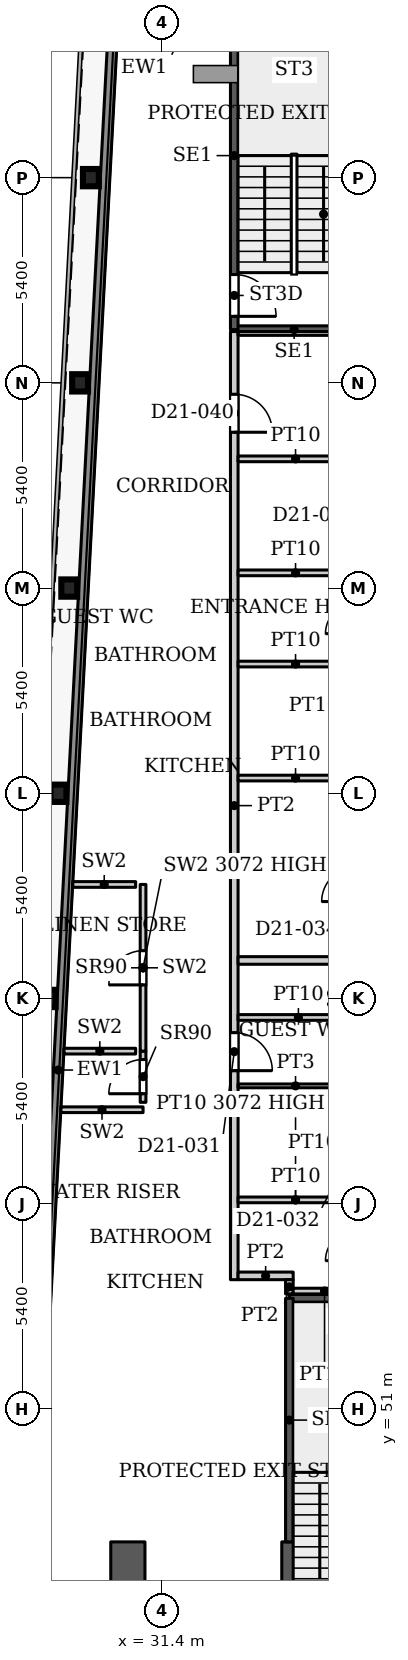
"""IFC4 building model, lengths in metres.
Left out: names, types, materials, properties, quantities, classifications, styles, units other than length and angle.
Written with IfcOpenShell. Run it as: python <this file> out.ifc"""

import sys

from ifc_helpers import new_model, si_unit, direction, frame, frame_2d, origin, origin_2d, place, context, subcontext, project, spatial, rectangle, i_section, extrude, source, transform, mapped, element, fill, save


model = new_model("IFC4")
c1 = context("Model", 3, precision=1e-05, world=origin(), true_north=direction((0.0, 1.0)))
c2 = subcontext(c1, "Body", "Model", "MODEL_VIEW")
j1 = project(units=[si_unit("LENGTHUNIT", "METRE"), si_unit("PLANEANGLEUNIT", "RADIAN")], contexts=[c1])
p1 = place(None, origin())
s1 = spatial("IfcSite", under=j1, at=p1, CompositionType="ELEMENT")
p2 = place(p1, origin())
s2 = spatial("IfcBuilding", under=s1, at=p2, CompositionType="ELEMENT")
p3 = place(p2, frame((0.0, 0.0, 98.0)))
s3 = spatial("IfcBuildingStorey", under=s2, at=p3, CompositionType="ELEMENT", Elevation=98.0)
for number, where, z_axis, x_axis in (
    (1, (28.39, 61.8, 0.0), (0.0, 0.0, 1.0), (1.0, 0.0, 0.0)),
    (2, (28.674, 67.2, 0.0), (0.0, 0.0, 1.0), (1.0, 0.0, 0.0)),
    (3, (28.958, 72.6, 0.0), (0.0, 0.0, 1.0), (1.0, 0.0, 0.0)),
    (4, (29.243, 78.0, 0.0), (0.0, 0.0, 1.0), (1.0, 0.0, 0.0)),
    (5, (29.527, 83.4, 0.0), (0.0, 0.0, 1.0), (1.0, 0.0, 0.0)),
):
    element("IfcColumn", number, at=place(p3, frame(where, z_axis=z_axis, x_axis=x_axis)), inside=s3, PredefinedType="COLUMN", context=c2, shape_type="SweptSolid", body=[
        extrude(i_section(OverallWidth=0.418, OverallDepth=0.455, WebThickness=0.042, FlangeThickness=0.068, FilletRadius=0.014, at=origin_2d()), origin(), (0.0, 0.0, 1.0), 3.9),
    ])
p4 = place(p3, frame((34.75, 29.05, 0.0), z_axis=(0.0, 0.0, 1.0), x_axis=(0.0, 1.0, 0.0)))
e6 = element("IfcWall", 6, at=p4, inside=s3, PredefinedType="SHEAR", context=c2, shape_type="SweptSolid", body=[
    extrude(rectangle(XDim=18.45, YDim=0.4, at=frame_2d((9.225, 0.0))), origin(), (0.0, 0.0, 1.0), 3.9),
])
p5 = place(p4, frame((8.025, 0.0, 0.0)))
e7 = element("IfcOpeningElement", 7, at=p5, cuts=e6, PredefinedType="OPENING", context=c2, shape_type="SweptSolid", body=[
    extrude(rectangle(XDim=1.1, YDim=2.2, at=frame_2d((0.55, 1.1))), frame((0.0, 0.21, 0.0), z_axis=(0.0, -1.0, 0.0), x_axis=(1.0, 0.0, 0.0)), (0.0, 0.0, 1.0), 0.42),
])
p6 = place(p4, frame((10.875, 0.0, 0.0)))
e8 = element("IfcOpeningElement", 8, at=p6, cuts=e6, PredefinedType="OPENING", context=c2, shape_type="SweptSolid", body=[
    extrude(rectangle(XDim=1.1, YDim=2.2, at=frame_2d((0.55, 1.1))), frame((0.0, 0.21, 0.0), z_axis=(0.0, -1.0, 0.0), x_axis=(1.0, 0.0, 0.0)), (0.0, 0.0, 1.0), 0.42),
])
p7 = place(p4, frame((13.725, 0.0, 0.0)))
e9 = element("IfcOpeningElement", 9, at=p7, cuts=e6, PredefinedType="OPENING", context=c2, shape_type="SweptSolid", body=[
    extrude(rectangle(XDim=1.1, YDim=2.2, at=frame_2d((0.55, 1.1))), frame((0.0, 0.21, 0.0), z_axis=(0.0, -1.0, 0.0), x_axis=(1.0, 0.0, 0.0)), (0.0, 0.0, 1.0), 0.42),
])
p8 = place(p4, frame((15.95, 0.0, 0.0)))
e10 = element("IfcOpeningElement", 10, at=p8, cuts=e6, PredefinedType="OPENING", context=c2, shape_type="SweptSolid", body=[
    extrude(rectangle(XDim=1.1, YDim=2.2, at=frame_2d((0.55, 1.1))), frame((0.0, 0.21, 0.0), z_axis=(0.0, -1.0, 0.0), x_axis=(1.0, 0.0, 0.0)), (0.0, 0.0, 1.0), 0.42),
])
p9 = place(p3, frame((30.5, 29.05, 0.0), z_axis=(0.0, 0.0, 1.0), x_axis=(0.0, 1.0, 0.0)))
e11 = element("IfcWall", 11, at=p9, inside=s3, PredefinedType="SHEAR", context=c2, shape_type="SweptSolid", body=[
    extrude(rectangle(XDim=18.45, YDim=0.9, at=frame_2d((9.225, 0.0))), origin(), (0.0, 0.0, 1.0), 3.9),
])
p10 = place(p9, frame((1.5, 0.0, 0.0)))
e12 = element("IfcOpeningElement", 12, at=p10, cuts=e11, PredefinedType="OPENING", context=c2, shape_type="SweptSolid", body=[
    extrude(rectangle(XDim=0.9, YDim=2.2, at=frame_2d((0.45, 1.1))), frame((0.0, 0.46, 0.0), z_axis=(0.0, -1.0, 0.0), x_axis=(1.0, 0.0, 0.0)), (0.0, 0.0, 1.0), 0.92),
])
p11 = place(p9, frame((6.03, 0.0, 0.0)))
e13 = element("IfcOpeningElement", 13, at=p11, cuts=e11, PredefinedType="OPENING", context=c2, shape_type="SweptSolid", body=[
    extrude(rectangle(XDim=0.9, YDim=2.2, at=frame_2d((0.45, 1.1))), frame((0.0, 0.46, 0.0), z_axis=(0.0, -1.0, 0.0), x_axis=(1.0, 0.0, 0.0)), (0.0, 0.0, 1.0), 0.92),
])
p12 = place(p9, frame((9.7, 0.0, 0.0)))
e14 = element("IfcOpeningElement", 14, at=p12, cuts=e11, PredefinedType="OPENING", context=c2, shape_type="SweptSolid", body=[
    extrude(rectangle(XDim=0.9, YDim=2.2, at=frame_2d((0.45, 1.1))), frame((0.0, 0.46, 0.0), z_axis=(0.0, -1.0, 0.0), x_axis=(1.0, 0.0, 0.0)), (0.0, 0.0, 1.0), 0.92),
])
p13 = place(p3, frame((27.195, 31.969, 0.0), z_axis=(0.0, 0.0, 1.0), x_axis=(0.052559748861, 0.998617781135, 0.0)))
e15 = element("IfcWall", 15, at=p13, inside=s3, PredefinedType="SOLIDWALL", context=c2, shape_type="SweptSolid", body=[
    extrude(rectangle(XDim=55.972, YDim=0.25, at=frame_2d((27.986, 0.0))), origin(), (0.0, 0.0, 1.0), 3.75),
])
p14 = place(p3, frame((34.75, 53.91, 0.0), z_axis=(0.0, 0.0, 1.0), x_axis=(1.0, 0.0, 0.0)))
e16 = element("IfcWall", 16, at=p14, inside=s3, PredefinedType="SHEAR", context=c2, shape_type="SweptSolid", body=[
    extrude(rectangle(XDim=3.15, YDim=0.2, at=frame_2d((1.575, 0.0))), origin(), (0.0, 0.0, 1.0), 3.9),
])
p15 = place(p3, frame((34.75, 47.5, 0.0), z_axis=(0.0, 0.0, 1.0), x_axis=(0.0, 1.0, 0.0)))
e17 = element("IfcWall", 17, at=p15, inside=s3, PredefinedType="SHEAR", context=c2, shape_type="SweptSolid", body=[
    extrude(rectangle(XDim=6.41, YDim=0.2, at=frame_2d((3.205, 0.0))), origin(), (0.0, 0.0, 1.0), 3.9),
])
p16 = place(p3, frame((33.3, 79.4, 0.0), z_axis=(0.0, 0.0, 1.0), x_axis=(1.0, 0.0, 0.0)))
e18 = element("IfcWall", 18, at=p16, inside=s3, PredefinedType="SHEAR", context=c2, shape_type="SweptSolid", body=[
    extrude(rectangle(XDim=3.15, YDim=0.2, at=frame_2d((1.575, 0.0))), origin(), (0.0, 0.0, 1.0), 3.9),
])
p17 = place(p3, frame((33.3, 79.4, 0.0), z_axis=(0.0, 0.0, 1.0), x_axis=(0.0, 1.0, 0.0)))
e19 = element("IfcWall", 19, at=p17, inside=s3, PredefinedType="SHEAR", context=c2, shape_type="SweptSolid", body=[
    extrude(rectangle(XDim=9.16, YDim=0.2, at=frame_2d((4.58, 0.0))), origin(), (0.0, 0.0, 1.0), 3.9),
])
p18 = place(p17, frame((0.35, 0.0, 0.0)))
e20 = element("IfcOpeningElement", 20, at=p18, cuts=e19, PredefinedType="OPENING", context=c2, shape_type="SweptSolid", body=[
    extrude(rectangle(XDim=1.1, YDim=2.2, at=frame_2d((0.55, 1.1))), frame((0.0, 0.11, 0.0), z_axis=(0.0, -1.0, 0.0), x_axis=(1.0, 0.0, 0.0)), (0.0, 0.0, 1.0), 0.22),
])
p19 = place(p3, frame((28.739, 58.872, 0.0), z_axis=(0.0, 0.0, 1.0), x_axis=(1.0, 0.0, 0.0)))
e21 = element("IfcWall", 21, at=p19, inside=s3, PredefinedType="PARTITIONING", context=c2, shape_type="SweptSolid", body=[
    extrude(rectangle(XDim=2.161, YDim=0.15, at=frame_2d((1.081, 0.0))), origin(), (0.0, 0.0, 1.0), 3.9),
])
p20 = place(p3, frame((30.9, 59.067, 0.0), z_axis=(0.0, 0.0, 1.0), x_axis=(0.0, 1.0, 0.0)))
e22 = element("IfcWall", 22, at=p20, inside=s3, PredefinedType="PARTITIONING", context=c2, shape_type="SweptSolid", body=[
    extrude(rectangle(XDim=1.347, YDim=0.15, at=frame_2d((0.674, 0.0))), origin(), (0.0, 0.0, 1.0), 3.9),
])
p21 = place(p20, frame((0.226, 0.0, 0.0)))
e23 = element("IfcOpeningElement", 23, at=p21, cuts=e22, PredefinedType="OPENING", context=c2, shape_type="SweptSolid", body=[
    extrude(rectangle(XDim=0.9, YDim=2.2, at=frame_2d((0.45, 1.1))), frame((0.0, 0.085, 0.0), z_axis=(0.0, -1.0, 0.0), x_axis=(1.0, 0.0, 0.0)), (0.0, 0.0, 1.0), 0.17),
])
p22 = place(p3, frame((28.82, 60.414, 0.0), z_axis=(0.0, 0.0, 1.0), x_axis=(1.0, 0.0, 0.0)))
e24 = element("IfcWall", 24, at=p22, inside=s3, PredefinedType="PARTITIONING", context=c2, shape_type="SweptSolid", body=[
    extrude(rectangle(XDim=1.885, YDim=0.15, at=frame_2d((0.942, 0.0))), origin(), (0.0, 0.0, 1.0), 3.9),
])
p23 = place(p3, frame((30.9, 60.414, 0.0), z_axis=(0.0, 0.0, 1.0), x_axis=(0.0, 1.0, 0.0)))
e25 = element("IfcWall", 25, at=p23, inside=s3, PredefinedType="PARTITIONING", context=c2, shape_type="SweptSolid", body=[
    extrude(rectangle(XDim=4.386, YDim=0.15, at=frame_2d((2.193, 0.0))), origin(), (0.0, 0.0, 1.0), 3.072),
])
p24 = place(p23, frame((1.743, 0.0, 0.0)))
e26 = element("IfcOpeningElement", 26, at=p24, cuts=e25, PredefinedType="OPENING", context=c2, shape_type="SweptSolid", body=[
    extrude(rectangle(XDim=0.9, YDim=2.2, at=frame_2d((0.45, 1.1))), frame((0.0, 0.085, 0.0), z_axis=(0.0, -1.0, 0.0), x_axis=(1.0, 0.0, 0.0)), (0.0, 0.0, 1.0), 0.17),
])
p25 = place(p3, frame((29.051, 64.8, 0.0), z_axis=(0.0, 0.0, 1.0), x_axis=(1.0, 0.0, 0.0)))
e27 = element("IfcWall", 27, at=p25, inside=s3, PredefinedType="PARTITIONING", context=c2, shape_type="SweptSolid", body=[
    extrude(rectangle(XDim=1.654, YDim=0.15, at=frame_2d((0.827, 0.0))), origin(), (0.0, 0.0, 1.0), 3.9),
])
p26 = place(p3, frame((33.3, 54.4, 0.0), z_axis=(0.0, 0.0, 1.0), x_axis=(0.0, 1.0, 0.0)))
e28 = element("IfcWall", 28, at=p26, inside=s3, PredefinedType="PARTITIONING", context=c2, shape_type="SweptSolid", body=[
    extrude(rectangle(XDim=24.95, YDim=0.2, at=frame_2d((12.475, 0.0))), origin(), (0.0, 0.0, 1.0), 3.6),
])
p27 = place(p26, frame((5.5, 0.0, 0.0)))
e29 = element("IfcOpeningElement", 29, at=p27, cuts=e28, PredefinedType="OPENING", context=c2, shape_type="SweptSolid", body=[
    extrude(rectangle(XDim=1.0, YDim=2.1, at=frame_2d((0.5, 1.05))), frame((0.0, 0.11, 0.0), z_axis=(0.0, -1.0, 0.0), x_axis=(1.0, 0.0, 0.0)), (0.0, 0.0, 1.0), 0.22),
])
p28 = place(p26, frame((22.3, 0.0, 0.0)))
e30 = element("IfcOpeningElement", 30, at=p28, cuts=e28, PredefinedType="OPENING", context=c2, shape_type="SweptSolid", body=[
    extrude(rectangle(XDim=1.0, YDim=2.1, at=frame_2d((0.5, 1.05))), frame((0.0, 0.11, 0.0), z_axis=(0.0, -1.0, 0.0), x_axis=(1.0, 0.0, 0.0)), (0.0, 0.0, 1.0), 0.22),
])
p29 = place(p3, frame((33.4, 54.5, 0.0), z_axis=(0.0, 0.0, 1.0), x_axis=(1.0, 0.0, 0.0)))
e31 = element("IfcWall", 31, at=p29, inside=s3, PredefinedType="PARTITIONING", context=c2, shape_type="SweptSolid", body=[
    extrude(rectangle(XDim=1.45, YDim=0.2, at=frame_2d((0.725, 0.0))), origin(), (0.0, 0.0, 1.0), 3.6),
])
p30 = place(p3, frame((33.4, 56.5, 0.0), z_axis=(0.0, 0.0, 1.0), x_axis=(1.0, 0.0, 0.0)))
e32 = element("IfcWall", 32, at=p30, inside=s3, PredefinedType="PARTITIONING", context=c2, shape_type="SweptSolid", body=[
    extrude(rectangle(XDim=3.025, YDim=0.15, at=frame_2d((1.513, 0.0))), origin(), (0.0, 0.0, 1.0), 3.072),
])
p31 = place(p3, frame((33.4, 59.5, 0.0), z_axis=(0.0, 0.0, 1.0), x_axis=(1.0, 0.0, 0.0)))
e33 = element("IfcWall", 33, at=p31, inside=s3, PredefinedType="PARTITIONING", context=c2, shape_type="SweptSolid", body=[
    extrude(rectangle(XDim=3.025, YDim=0.1, at=frame_2d((1.513, 0.0))), origin(), (0.0, 0.0, 1.0), 3.6),
])
p32 = place(p3, frame((33.4, 61.3, 0.0), z_axis=(0.0, 0.0, 1.0), x_axis=(1.0, 0.0, 0.0)))
e34 = element("IfcWall", 34, at=p32, inside=s3, PredefinedType="PARTITIONING", context=c2, shape_type="SweptSolid", body=[
    extrude(rectangle(XDim=3.175, YDim=0.15, at=frame_2d((1.587, 0.0))), origin(), (0.0, 0.0, 1.0), 3.6),
])
p33 = place(p3, frame((33.4, 62.8, 0.0), z_axis=(0.0, 0.0, 1.0), x_axis=(1.0, 0.0, 0.0)))
e35 = element("IfcWall", 35, at=p33, inside=s3, PredefinedType="PARTITIONING", context=c2, shape_type="SweptSolid", body=[
    extrude(rectangle(XDim=12.5, YDim=0.2, at=frame_2d((6.25, 0.0))), origin(), (0.0, 0.0, 1.0), 3.6),
])
for number, where, z_axis, x_axis in (
    (36, (33.4, 67.6, 0.0), (0.0, 0.0, 1.0), (1.0, 0.0, 0.0)),
    (37, (33.4, 70.6, 0.0), (0.0, 0.0, 1.0), (1.0, 0.0, 0.0)),
    (38, (33.4, 73.0, 0.0), (0.0, 0.0, 1.0), (1.0, 0.0, 0.0)),
    (39, (33.4, 76.0, 0.0), (0.0, 0.0, 1.0), (1.0, 0.0, 0.0)),
):
    element("IfcWall", number, at=place(p3, frame(where, z_axis=z_axis, x_axis=x_axis)), inside=s3, PredefinedType="PARTITIONING", context=c2, shape_type="SweptSolid", body=[
        extrude(rectangle(XDim=3.025, YDim=0.15, at=frame_2d((1.513, 0.0))), origin(), (0.0, 0.0, 1.0), 3.6),
    ])
p34 = place(p3, frame((33.4, 79.3, 0.0), z_axis=(0.0, 0.0, 1.0), x_axis=(1.0, 0.0, 0.0)))
e40 = element("IfcWall", 40, at=p34, inside=s3, PredefinedType="PARTITIONING", context=c2, shape_type="SweptSolid", body=[
    extrude(rectangle(XDim=12.5, YDim=0.1, at=frame_2d((6.25, 0.0))), origin(), (0.0, 0.0, 1.0), 3.6),
])
p35 = place(p34, frame((3.053, 0.0, 0.0)))
e41 = element("IfcOpeningElement", 41, at=p35, cuts=e40, PredefinedType="OPENING", context=c2, shape_type="SweptSolid", body=[
    extrude(rectangle(XDim=0.9, YDim=2.1, at=frame_2d((0.45, 1.05))), frame((0.0, 0.06, 0.0), z_axis=(0.0, -1.0, 0.0), x_axis=(1.0, 0.0, 0.0)), (0.0, 0.0, 1.0), 0.12),
])
p36 = place(p3, frame((34.75, 54.025, 0.0), z_axis=(0.0, 0.0, 1.0), x_axis=(0.0, 1.0, 0.0)))
e42 = element("IfcWall", 42, at=p36, inside=s3, PredefinedType="PARTITIONING", context=c2, shape_type="SweptSolid", body=[
    extrude(rectangle(XDim=0.375, YDim=0.2, at=frame_2d((0.188, 0.0))), origin(), (0.0, 0.0, 1.0), 3.6),
])
p37 = place(p3, frame((34.85, 54.1, 0.0), z_axis=(0.0, 0.0, 1.0), x_axis=(1.0, 0.0, 0.0)))
e43 = element("IfcWall", 43, at=p37, inside=s3, PredefinedType="PARTITIONING", context=c2, shape_type="SweptSolid", body=[
    extrude(rectangle(XDim=1.65, YDim=0.15, at=frame_2d((0.825, 0.0))), origin(), (0.0, 0.0, 1.0), 3.6),
])
m1 = source(origin(), c2, "Body", "SweptSolid", [
    extrude(rectangle(XDim=0.9, YDim=2.2, at=frame_2d((0.45, 1.1))), frame((0.0, 0.025, 0.0), z_axis=(0.0, -1.0, 0.0), x_axis=(1.0, 0.0, 0.0)), (0.0, 0.0, 1.0), 0.05),
])
p38 = place(p21, origin())
e44 = element("IfcDoor", 44, at=p38, inside=s3, OperationType="SINGLE_SWING_LEFT", PredefinedType="DOOR", context=c2, shape_type="MappedRepresentation", body=[
    mapped(m1, transform((0.0, 0.0, 0.0), x_axis=(1.0, 0.0, 0.0), y_axis=(0.0, 1.0, 0.0), z_axis=(0.0, 0.0, 1.0), scale=1.0)),
])
fill(e23, e44)
p39 = place(p24, origin())
e45 = element("IfcDoor", 45, at=p39, inside=s3, OperationType="SINGLE_SWING_LEFT", PredefinedType="DOOR", context=c2, shape_type="MappedRepresentation", body=[
    mapped(m1, transform((0.0, 0.0, 0.0), x_axis=(1.0, 0.0, 0.0), y_axis=(0.0, 1.0, 0.0), z_axis=(0.0, 0.0, 1.0), scale=1.0)),
])
fill(e26, e45)
m2 = source(origin(), c2, "Body", "SweptSolid", [
    extrude(rectangle(XDim=1.1, YDim=2.2, at=frame_2d((0.55, 1.1))), frame((0.0, 0.025, 0.0), z_axis=(0.0, -1.0, 0.0), x_axis=(1.0, 0.0, 0.0)), (0.0, 0.0, 1.0), 0.05),
])
p40 = place(p18, origin())
e46 = element("IfcDoor", 46, at=p40, inside=s3, OperationType="SINGLE_SWING_RIGHT", PredefinedType="DOOR", context=c2, shape_type="MappedRepresentation", body=[
    mapped(m2, transform((0.0, 0.0, 0.0), x_axis=(1.0, 0.0, 0.0), y_axis=(0.0, 1.0, 0.0), z_axis=(0.0, 0.0, 1.0), scale=1.0)),
])
fill(e20, e46)
m3 = source(origin(), c2, "Body", "SweptSolid", [
    extrude(rectangle(XDim=1.0, YDim=2.1, at=frame_2d((0.5, 1.05))), frame((0.0, 0.025, 0.0), z_axis=(0.0, -1.0, 0.0), x_axis=(1.0, 0.0, 0.0)), (0.0, 0.0, 1.0), 0.05),
])
p41 = place(p27, origin())
e47 = element("IfcDoor", 47, at=p41, inside=s3, OperationType="SINGLE_SWING_RIGHT", PredefinedType="DOOR", context=c2, shape_type="MappedRepresentation", body=[
    mapped(m3, transform((0.0, 0.0, 0.0), x_axis=(1.0, 0.0, 0.0), y_axis=(0.0, 1.0, 0.0), z_axis=(0.0, 0.0, 1.0), scale=1.0)),
])
fill(e29, e47)
p42 = place(p28, origin())
e48 = element("IfcDoor", 48, at=p42, inside=s3, OperationType="SINGLE_SWING_RIGHT", PredefinedType="DOOR", context=c2, shape_type="MappedRepresentation", body=[
    mapped(m3, transform((0.0, 0.0, 0.0), x_axis=(1.0, 0.0, 0.0), y_axis=(0.0, 1.0, 0.0), z_axis=(0.0, 0.0, 1.0), scale=1.0)),
])
fill(e30, e48)
save(model, sys.argv[1])
